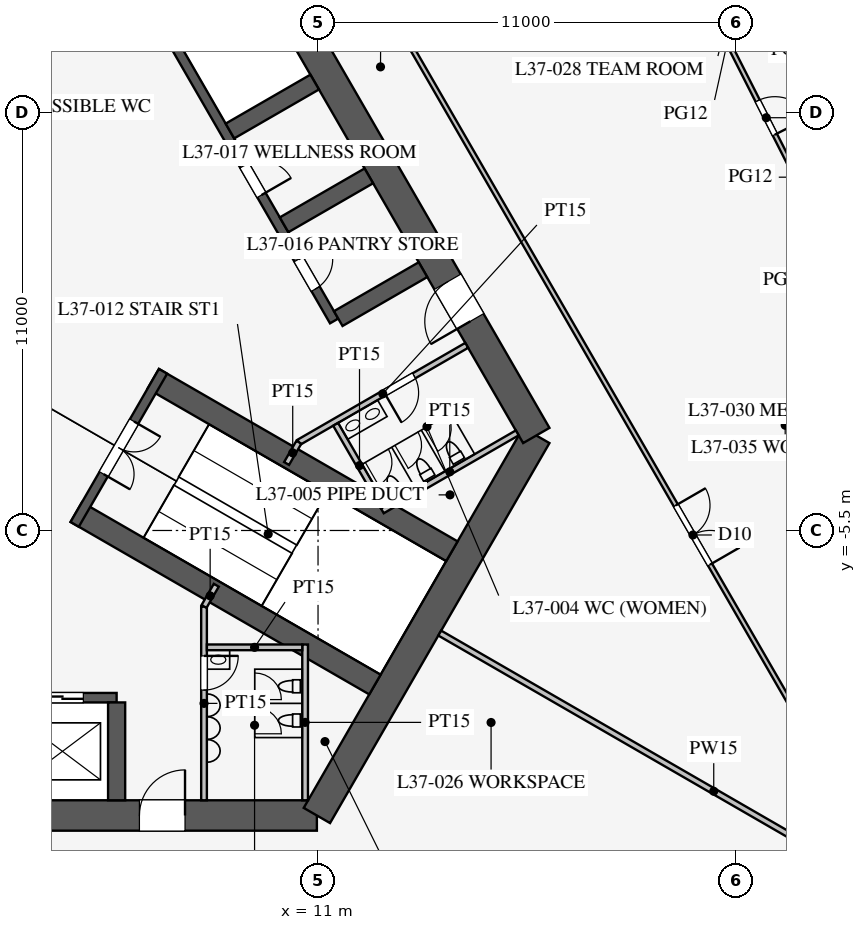
"""IFC4 building model, lengths in metres.
Left out: names, types, materials, properties, quantities, classifications, styles, units other than length and angle.
Written with IfcOpenShell. Run it as: python <this file> out.ifc"""

import sys

from ifc_helpers import new_model, si_unit, direction, frame, frame_2d, origin, place, context, subcontext, project, spatial, rectangle, extrude, element, fill, save


model = new_model("IFC4")
c1 = context("Model", 3, precision=1e-05, world=origin(), true_north=direction((0.0, 1.0)))
c2 = subcontext(c1, "Body", "Model", "MODEL_VIEW")
j1 = project(units=[si_unit("LENGTHUNIT", "METRE"), si_unit("PLANEANGLEUNIT", "RADIAN")], contexts=[c1])
p1 = place(None, origin())
s1 = spatial("IfcSite", under=j1, at=p1, CompositionType="ELEMENT")
p2 = place(p1, origin())
s2 = spatial("IfcBuilding", under=s1, at=p2, CompositionType="ELEMENT")
p3 = place(p2, frame((0.0, 0.0, 161.9)))
s3 = spatial("IfcBuildingStorey", under=s2, at=p3, CompositionType="ELEMENT", Elevation=161.9)
p4 = place(p3, frame((-10.97, -13.0, 0.0), z_axis=(0.0, 0.0, 1.0), x_axis=(1.0, 0.0, 0.0)))
e1 = element("IfcWall", 1, at=p4, inside=s3, PredefinedType="SHEAR", context=c2, shape_type="SweptSolid", body=[
    extrude(rectangle(XDim=21.939, YDim=0.8, at=frame_2d((10.97, 0.0))), origin(), (0.0, 0.0, 1.0), 4.2),
])
p5 = place(p4, frame((17.27, 0.0, 0.0)))
e2 = element("IfcOpeningElement", 2, at=p5, cuts=e1, PredefinedType="OPENING", context=c2, shape_type="SweptSolid", body=[
    extrude(rectangle(XDim=1.2, YDim=2.1, at=frame_2d((0.6, 1.05))), frame((0.0, 0.41, 0.0), z_axis=(0.0, -1.0, 0.0), x_axis=(1.0, 0.0, 0.0)), (0.0, 0.0, 1.0), 0.82),
])
p6 = place(p4, frame((3.47, 0.0, 0.0)))
e3 = element("IfcOpeningElement", 3, at=p6, cuts=e1, PredefinedType="OPENING", context=c2, shape_type="SweptSolid", body=[
    extrude(rectangle(XDim=1.2, YDim=2.1, at=frame_2d((0.6, 1.05))), frame((0.0, 0.41, 0.0), z_axis=(0.0, -1.0, 0.0), x_axis=(1.0, 0.0, 0.0)), (0.0, 0.0, 1.0), 0.82),
])
p7 = place(p3, frame((10.97, -13.0, 0.0), z_axis=(0.0, 0.0, 1.0), x_axis=(0.499995765644, 0.866027848477, 0.0)))
e4 = element("IfcWall", 4, at=p7, inside=s3, PredefinedType="SHEAR", context=c2, shape_type="SweptSolid", body=[
    extrude(rectangle(XDim=11.547, YDim=0.8, at=frame_2d((5.773, 0.0))), origin(), (0.0, 0.0, 1.0), 4.2),
])
p8 = place(p3, frame((16.743, -3.0, 0.0), z_axis=(0.0, 0.0, 1.0), x_axis=(-0.500002442456, 0.866023993627, 0.0)))
e5 = element("IfcWall", 5, at=p8, inside=s3, PredefinedType="SHEAR", context=c2, shape_type="SweptSolid", body=[
    extrude(rectangle(XDim=21.939, YDim=0.8, at=frame_2d((10.97, 0.0))), origin(), (0.0, 0.0, 1.0), 4.2),
])
p9 = place(p8, frame((17.27, 0.0, 0.0)))
e6 = element("IfcOpeningElement", 6, at=p9, cuts=e5, PredefinedType="OPENING", context=c2, shape_type="SweptSolid", body=[
    extrude(rectangle(XDim=1.2, YDim=2.1, at=frame_2d((0.6, 1.05))), frame((0.0, 0.41, 0.0), z_axis=(0.0, -1.0, 0.0), x_axis=(1.0, 0.0, 0.0)), (0.0, 0.0, 1.0), 0.82),
])
p10 = place(p8, frame((3.47, 0.0, 0.0)))
e7 = element("IfcOpeningElement", 7, at=p10, cuts=e5, PredefinedType="OPENING", context=c2, shape_type="SweptSolid", body=[
    extrude(rectangle(XDim=1.2, YDim=2.1, at=frame_2d((0.6, 1.05))), frame((0.0, 0.41, 0.0), z_axis=(0.0, -1.0, 0.0), x_axis=(1.0, 0.0, 0.0)), (0.0, 0.0, 1.0), 0.82),
])
p11 = place(p3, frame((-5.7, -9.9, 0.0), z_axis=(0.0, 0.0, 1.0), x_axis=(1.0, 0.0, 0.0)))
e8 = element("IfcWall", 8, at=p11, inside=s3, PredefinedType="SHEAR", context=c2, shape_type="SweptSolid", body=[
    extrude(rectangle(XDim=11.4, YDim=0.25, at=frame_2d((5.7, 0.0))), origin(), (0.0, 0.0, 1.0), 4.2),
])
p12 = place(p11, frame((0.875, 0.0, 0.0)))
e9 = element("IfcOpeningElement", 9, at=p12, cuts=e8, PredefinedType="OPENING", context=c2, shape_type="SweptSolid", body=[
    extrude(rectangle(XDim=1.1, YDim=2.2, at=frame_2d((0.55, 1.1))), frame((0.0, 0.135, 0.0), z_axis=(0.0, -1.0, 0.0), x_axis=(1.0, 0.0, 0.0)), (0.0, 0.0, 1.0), 0.27),
])
p13 = place(p11, frame((3.725, 0.0, 0.0)))
e10 = element("IfcOpeningElement", 10, at=p13, cuts=e8, PredefinedType="OPENING", context=c2, shape_type="SweptSolid", body=[
    extrude(rectangle(XDim=1.1, YDim=2.2, at=frame_2d((0.55, 1.1))), frame((0.0, 0.135, 0.0), z_axis=(0.0, -1.0, 0.0), x_axis=(1.0, 0.0, 0.0)), (0.0, 0.0, 1.0), 0.27),
])
p14 = place(p11, frame((6.575, 0.0, 0.0)))
e11 = element("IfcOpeningElement", 11, at=p14, cuts=e8, PredefinedType="OPENING", context=c2, shape_type="SweptSolid", body=[
    extrude(rectangle(XDim=1.1, YDim=2.2, at=frame_2d((0.55, 1.1))), frame((0.0, 0.135, 0.0), z_axis=(0.0, -1.0, 0.0), x_axis=(1.0, 0.0, 0.0)), (0.0, 0.0, 1.0), 0.27),
])
p15 = place(p11, frame((9.425, 0.0, 0.0)))
e12 = element("IfcOpeningElement", 12, at=p15, cuts=e8, PredefinedType="OPENING", context=c2, shape_type="SweptSolid", body=[
    extrude(rectangle(XDim=1.1, YDim=2.2, at=frame_2d((0.55, 1.1))), frame((0.0, 0.135, 0.0), z_axis=(0.0, -1.0, 0.0), x_axis=(1.0, 0.0, 0.0)), (0.0, 0.0, 1.0), 0.27),
])
p16 = place(p3, frame((5.7, -10.025, 0.0), z_axis=(0.0, 0.0, 1.0), x_axis=(0.0, -1.0, 0.0)))
e13 = element("IfcWall", 13, at=p16, inside=s3, PredefinedType="SHEAR", context=c2, shape_type="SweptSolid", body=[
    extrude(rectangle(XDim=2.575, YDim=0.45, at=frame_2d((1.288, 0.0))), origin(), (0.0, 0.0, 1.0), 4.2),
])
p17 = place(p3, frame((11.424, 0.014, 0.0), z_axis=(0.0, 0.0, 1.0), x_axis=(-0.500001763848, 0.866024385424, 0.0)))
e14 = element("IfcWall", 14, at=p17, inside=s3, PredefinedType="SHEAR", context=c2, shape_type="SweptSolid", body=[
    extrude(rectangle(XDim=11.4, YDim=0.25, at=frame_2d((5.7, 0.0))), origin(), (0.0, 0.0, 1.0), 4.2),
])
p18 = place(p17, frame((0.975, 0.0, 0.0)))
e15 = element("IfcOpeningElement", 15, at=p18, cuts=e14, PredefinedType="OPENING", context=c2, shape_type="SweptSolid", body=[
    extrude(rectangle(XDim=0.9, YDim=2.1, at=frame_2d((0.45, 1.05))), frame((0.0, 0.135, 0.0), z_axis=(0.0, -1.0, 0.0), x_axis=(1.0, 0.0, 0.0)), (0.0, 0.0, 1.0), 0.27),
])
p19 = place(p17, frame((3.825, 0.0, 0.0)))
e16 = element("IfcOpeningElement", 16, at=p19, cuts=e14, PredefinedType="OPENING", context=c2, shape_type="SweptSolid", body=[
    extrude(rectangle(XDim=0.9, YDim=2.1, at=frame_2d((0.45, 1.05))), frame((0.0, 0.135, 0.0), z_axis=(0.0, -1.0, 0.0), x_axis=(1.0, 0.0, 0.0)), (0.0, 0.0, 1.0), 0.27),
])
for number, where, z_axis, x_axis in (
    (17, (11.532, 0.076, 0.0), (0.0, 0.0, 1.0), (0.866, 0.5, 0.0)),
    (18, (10.107, 2.544, 0.0), (0.0, 0.0, 1.0), (0.866, 0.5, 0.0)),
    (19, (8.682, 5.012, 0.0), (0.0, 0.0, 1.0), (0.866, 0.5, 0.0)),
):
    element("IfcWall", number, at=place(p3, frame(where, z_axis=z_axis, x_axis=x_axis)), inside=s3, PredefinedType="SHEAR", context=c2, shape_type="SweptSolid", body=[
        extrude(rectangle(XDim=2.575, YDim=0.45, at=frame_2d((1.288, 0.0))), origin(), (0.0, 0.0, 1.0), 4.2),
    ])
for number, where, z_axis, x_axis in (
    (20, (4.638, -5.016, 0.0), (0.0, 0.0, 1.0), (0.866, -0.5, 0.0)),
    (21, (6.663, -1.509, 0.0), (0.0, 0.0, 1.0), (0.866, -0.5, 0.0)),
):
    element("IfcWall", number, at=place(p3, frame(where, z_axis=z_axis, x_axis=x_axis)), inside=s3, PredefinedType="SHEAR", context=c2, shape_type="SweptSolid", body=[
        extrude(rectangle(XDim=9.075, YDim=0.6, at=frame_2d((4.538, 0.0))), origin(), (0.0, 0.0, 1.0), 4.2),
    ])
p20 = place(p3, frame((4.597, -5.339, 0.0), z_axis=(0.0, 0.0, 1.0), x_axis=(0.499984536904, 0.866034331223, 0.0)))
e22 = element("IfcWall", 22, at=p20, inside=s3, PredefinedType="SHEAR", context=c2, shape_type="SweptSolid", body=[
    extrude(rectangle(XDim=4.65, YDim=0.25, at=frame_2d((2.325, 0.0))), origin(), (0.0, 0.0, 1.0), 4.2),
])
p21 = place(p20, frame((1.525, 0.0, 0.0)))
e23 = element("IfcOpeningElement", 23, at=p21, cuts=e22, PredefinedType="OPENING", context=c2, shape_type="SweptSolid", body=[
    extrude(rectangle(XDim=1.6, YDim=2.1, at=frame_2d((0.8, 1.05))), frame((0.0, 0.135, 0.0), z_axis=(0.0, -1.0, 0.0), x_axis=(1.0, 0.0, 0.0)), (0.0, 0.0, 1.0), 0.27),
])
p22 = place(p3, frame((8.0, -7.5, 0.0), z_axis=(0.0, 0.0, 1.0), x_axis=(0.0, -1.0, 0.0)))
e24 = element("IfcWall", 24, at=p22, inside=s3, PredefinedType="PARTITIONING", context=c2, shape_type="SweptSolid", body=[
    extrude(rectangle(XDim=5.1, YDim=0.15, at=frame_2d((2.55, 0.0))), origin(), (0.0, 0.0, 1.0), 4.0),
])
p23 = place(p22, frame((1.3, 0.0, 0.0)))
e25 = element("IfcOpeningElement", 25, at=p23, cuts=e24, PredefinedType="OPENING", context=c2, shape_type="SweptSolid", body=[
    extrude(rectangle(XDim=0.9, YDim=2.1, at=frame_2d((0.45, 1.05))), frame((0.0, 0.085, 0.0), z_axis=(0.0, -1.0, 0.0), x_axis=(1.0, 0.0, 0.0)), (0.0, 0.0, 1.0), 0.17),
])
p24 = place(p3, frame((10.495, -3.178, 0.0), z_axis=(0.0, 0.0, 1.0), x_axis=(0.86602216432, 0.500005610874, 0.0)))
e26 = element("IfcWall", 26, at=p24, inside=s3, PredefinedType="PARTITIONING", context=c2, shape_type="SweptSolid", body=[
    extrude(rectangle(XDim=5.1, YDim=0.15, at=frame_2d((2.55, 0.0))), origin(), (0.0, 0.0, 1.0), 4.0),
])
p25 = place(p24, frame((2.6, 0.0, 0.0)))
e27 = element("IfcOpeningElement", 27, at=p25, cuts=e26, PredefinedType="OPENING", context=c2, shape_type="SweptSolid", body=[
    extrude(rectangle(XDim=0.9, YDim=2.1, at=frame_2d((0.45, 1.05))), frame((0.0, 0.085, 0.0), z_axis=(0.0, -1.0, 0.0), x_axis=(1.0, 0.0, 0.0)), (0.0, 0.0, 1.0), 0.17),
])
for number, where, z_axis, x_axis in (
    (28, (8.0, -7.5, 0.0), (0.0, 0.0, 1.0), (0.5, 0.866, 0.0)),
    (29, (10.495, -3.178, 0.0), (0.0, 0.0, 1.0), (-0.5, -0.866, 0.0)),
):
    element("IfcWall", number, at=place(p3, frame(where, z_axis=z_axis, x_axis=x_axis)), inside=s3, PredefinedType="PARTITIONING", context=c2, shape_type="SweptSolid", body=[
        extrude(rectangle(XDim=0.645, YDim=0.15, at=frame_2d((0.323, 0.0))), origin(), (0.0, 0.0, 1.0), 4.0),
    ])
p26 = place(p3, frame((10.66, -8.5, 0.0), z_axis=(0.0, 0.0, 1.0), x_axis=(0.0, -1.0, 0.0)))
e30 = element("IfcWall", 30, at=p26, inside=s3, PredefinedType="PARTITIONING", context=c2, shape_type="SweptSolid", body=[
    extrude(rectangle(XDim=4.1, YDim=0.15, at=frame_2d((2.05, 0.0))), origin(), (0.0, 0.0, 1.0), 4.0),
])
p27 = place(p3, frame((8.075, -8.575, 0.0), z_axis=(0.0, 0.0, 1.0), x_axis=(1.0, 0.0, 0.0)))
e31 = element("IfcWall", 31, at=p27, inside=s3, PredefinedType="PARTITIONING", context=c2, shape_type="SweptSolid", body=[
    extrude(rectangle(XDim=2.51, YDim=0.15, at=frame_2d((1.255, 0.0))), origin(), (0.0, 0.0, 1.0), 4.0),
])
p28 = place(p3, frame((12.691, -4.982, 0.0), z_axis=(0.0, 0.0, 1.0), x_axis=(0.8660249478, 0.500000789788, 0.0)))
e32 = element("IfcWall", 32, at=p28, inside=s3, PredefinedType="PARTITIONING", context=c2, shape_type="SweptSolid", body=[
    extrude(rectangle(XDim=4.1, YDim=0.15, at=frame_2d((2.05, 0.0))), origin(), (0.0, 0.0, 1.0), 4.0),
])
p29 = place(p3, frame((11.464, -2.706, 0.0), z_axis=(0.0, 0.0, 1.0), x_axis=(0.50001992892, -0.866013897511, 0.0)))
e33 = element("IfcWall", 33, at=p29, inside=s3, PredefinedType="PARTITIONING", context=c2, shape_type="SweptSolid", body=[
    extrude(rectangle(XDim=2.51, YDim=0.15, at=frame_2d((1.255, 0.0))), origin(), (0.0, 0.0, 1.0), 4.0),
])
p30 = place(p3, frame((14.203, -8.2, 0.0), z_axis=(0.0, 0.0, 1.0), x_axis=(0.866024668836, -0.500001272966, 0.0)))
e34 = element("IfcWall", 34, at=p30, inside=s3, PredefinedType="PARTITIONING", context=c2, shape_type="SweptSolid", body=[
    extrude(rectangle(XDim=16.65, YDim=0.15, at=frame_2d((8.325, 0.0))), origin(), (0.0, 0.0, 1.0), 2.3),
])
p31 = place(p3, frame((26.415, -15.231, 0.0), z_axis=(0.0, 0.0, 1.0), x_axis=(-0.50000091641, 0.866024874695, 0.0)))
e35 = element("IfcWall", 35, at=p31, inside=s3, PredefinedType="PARTITIONING", context=c2, shape_type="SweptSolid", body=[
    extrude(rectangle(XDim=52.796, YDim=0.12, at=frame_2d((26.398, 0.0))), origin(), (0.0, 0.0, 1.0), 2.9),
])
p32 = place(p31, frame((10.2, 0.0, 0.15)))
e36 = element("IfcOpeningElement", 36, at=p32, cuts=e35, PredefinedType="OPENING", context=c2, shape_type="SweptSolid", body=[
    extrude(rectangle(XDim=1.8, YDim=2.1, at=frame_2d((0.9, 1.05))), frame((0.0, 0.07, 0.0), z_axis=(0.0, -1.0, 0.0), x_axis=(1.0, 0.0, 0.0)), (0.0, 0.0, 1.0), 0.14),
])
p33 = place(p31, frame((40.8, 0.0, 0.15)))
e37 = element("IfcOpeningElement", 37, at=p33, cuts=e35, PredefinedType="OPENING", context=c2, shape_type="SweptSolid", body=[
    extrude(rectangle(XDim=1.8, YDim=2.1, at=frame_2d((0.9, 1.05))), frame((0.0, 0.07, 0.0), z_axis=(0.0, -1.0, 0.0), x_axis=(1.0, 0.0, 0.0)), (0.0, 0.0, 1.0), 0.14),
])
p34 = place(p3, frame((23.812, 3.356, 0.0), z_axis=(0.0, 0.0, 1.0), x_axis=(-0.452449820092, 0.891789863308, 0.0)))
e38 = element("IfcWall", 38, at=p34, inside=s3, PredefinedType="PARTITIONING", context=c2, shape_type="SweptSolid", body=[
    extrude(rectangle(XDim=4.507, YDim=0.12, at=frame_2d((2.253, 0.0))), origin(), (0.0, 0.0, 1.0), 2.9),
])
p35 = place(p34, frame((1.75, 0.0, 0.15)))
e39 = element("IfcOpeningElement", 39, at=p35, cuts=e38, PredefinedType="OPENING", context=c2, shape_type="SweptSolid", body=[
    extrude(rectangle(XDim=1.0, YDim=2.1, at=frame_2d((0.5, 1.05))), frame((0.0, 0.07, 0.0), z_axis=(0.0, -1.0, 0.0), x_axis=(1.0, 0.0, 0.0)), (0.0, 0.0, 1.0), 0.14),
])
p36 = place(p23, origin())
e40 = element("IfcDoor", 40, at=p36, inside=s3, OperationType="SINGLE_SWING_LEFT", PredefinedType="DOOR", context=c2, shape_type="SweptSolid", body=[
    extrude(rectangle(XDim=0.9, YDim=2.1, at=frame_2d((0.45, 1.05))), frame((0.0, 0.025, 0.0), z_axis=(0.0, -1.0, 0.0), x_axis=(1.0, 0.0, 0.0)), (0.0, 0.0, 1.0), 0.05),
])
fill(e25, e40)
p37 = place(p25, frame((0.9, 0.0, 0.0), z_axis=(0.0, 0.0, 1.0), x_axis=(-1.0, 0.0, 0.0)))
e41 = element("IfcDoor", 41, at=p37, inside=s3, OperationType="SINGLE_SWING_RIGHT", PredefinedType="DOOR", context=c2, shape_type="SweptSolid", body=[
    extrude(rectangle(XDim=0.9, YDim=2.1, at=frame_2d((0.45, 1.05))), frame((0.0, 0.025, 0.0), z_axis=(0.0, -1.0, 0.0), x_axis=(1.0, 0.0, 0.0)), (0.0, 0.0, 1.0), 0.05),
])
fill(e27, e41)
p38 = place(p21, frame((1.6, 0.0, 0.0), z_axis=(0.0, 0.0, 1.0), x_axis=(-1.0, 0.0, 0.0)))
e42 = element("IfcDoor", 42, at=p38, inside=s3, OperationType="DOUBLE_DOOR_SINGLE_SWING", PredefinedType="DOOR", context=c2, shape_type="SweptSolid", body=[
    extrude(rectangle(XDim=1.6, YDim=2.1, at=frame_2d((0.8, 1.05))), frame((0.0, 0.025, 0.0), z_axis=(0.0, -1.0, 0.0), x_axis=(1.0, 0.0, 0.0)), (0.0, 0.0, 1.0), 0.05),
])
fill(e23, e42)
p39 = place(p5, origin())
e43 = element("IfcDoor", 43, at=p39, inside=s3, OperationType="SINGLE_SWING_RIGHT", PredefinedType="DOOR", context=c2, shape_type="SweptSolid", body=[
    extrude(rectangle(XDim=1.2, YDim=2.1, at=frame_2d((0.6, 1.05))), frame((0.0, 0.025, 0.0), z_axis=(0.0, -1.0, 0.0), x_axis=(1.0, 0.0, 0.0)), (0.0, 0.0, 1.0), 0.05),
])
fill(e2, e43)
p40 = place(p10, origin())
e44 = element("IfcDoor", 44, at=p40, inside=s3, OperationType="SINGLE_SWING_LEFT", PredefinedType="DOOR", context=c2, shape_type="SweptSolid", body=[
    extrude(rectangle(XDim=1.2, YDim=2.1, at=frame_2d((0.6, 1.05))), frame((0.0, 0.025, 0.0), z_axis=(0.0, -1.0, 0.0), x_axis=(1.0, 0.0, 0.0)), (0.0, 0.0, 1.0), 0.05),
])
fill(e7, e44)
p41 = place(p18, frame((0.9, 0.0, 0.0), z_axis=(0.0, 0.0, 1.0), x_axis=(-1.0, 0.0, 0.0)))
e45 = element("IfcDoor", 45, at=p41, inside=s3, OperationType="SINGLE_SWING_LEFT", PredefinedType="DOOR", context=c2, shape_type="SweptSolid", body=[
    extrude(rectangle(XDim=0.9, YDim=2.1, at=frame_2d((0.45, 1.05))), frame((0.0, 0.025, 0.0), z_axis=(0.0, -1.0, 0.0), x_axis=(1.0, 0.0, 0.0)), (0.0, 0.0, 1.0), 0.05),
])
fill(e15, e45)
p42 = place(p19, frame((0.9, 0.0, 0.0), z_axis=(0.0, 0.0, 1.0), x_axis=(-1.0, 0.0, 0.0)))
e46 = element("IfcDoor", 46, at=p42, inside=s3, OperationType="SINGLE_SWING_RIGHT", PredefinedType="DOOR", context=c2, shape_type="SweptSolid", body=[
    extrude(rectangle(XDim=0.9, YDim=2.1, at=frame_2d((0.45, 1.05))), frame((0.0, 0.025, 0.0), z_axis=(0.0, -1.0, 0.0), x_axis=(1.0, 0.0, 0.0)), (0.0, 0.0, 1.0), 0.05),
])
fill(e16, e46)
p43 = place(p35, frame((1.0, 0.0, 0.0), z_axis=(0.0, 0.0, 1.0), x_axis=(-1.0, 0.0, 0.0)))
e47 = element("IfcDoor", 47, at=p43, inside=s3, OperationType="SINGLE_SWING_RIGHT", PredefinedType="DOOR", context=c2, shape_type="SweptSolid", body=[
    extrude(rectangle(XDim=1.0, YDim=2.1, at=frame_2d((0.5, 1.05))), frame((0.0, 0.025, 0.0), z_axis=(0.0, -1.0, 0.0), x_axis=(1.0, 0.0, 0.0)), (0.0, 0.0, 1.0), 0.05),
])
fill(e39, e47)
p44 = place(p32, frame((1.8, 0.0, 0.0), z_axis=(0.0, 0.0, 1.0), x_axis=(-1.0, 0.0, 0.0)))
e48 = element("IfcDoor", 48, at=p44, inside=s3, OperationType="DOUBLE_DOOR_SINGLE_SWING", PredefinedType="DOOR", context=c2, shape_type="SweptSolid", body=[
    extrude(rectangle(XDim=1.8, YDim=2.1, at=frame_2d((0.9, 1.05))), frame((0.0, 0.025, 0.0), z_axis=(0.0, -1.0, 0.0), x_axis=(1.0, 0.0, 0.0)), (0.0, 0.0, 1.0), 0.05),
])
fill(e36, e48)
p45 = place(p15, origin())
e49 = element("IfcDoor", 49, at=p45, inside=s3, OperationType="DOUBLE_DOOR_SLIDING", PredefinedType="DOOR", context=c2, shape_type="SweptSolid", body=[
    extrude(rectangle(XDim=1.1, YDim=2.2, at=frame_2d((0.55, 1.1))), frame((0.0, 0.025, 0.0), z_axis=(0.0, -1.0, 0.0), x_axis=(1.0, 0.0, 0.0)), (0.0, 0.0, 1.0), 0.05),
])
fill(e12, e49)
save(model, sys.argv[1])
